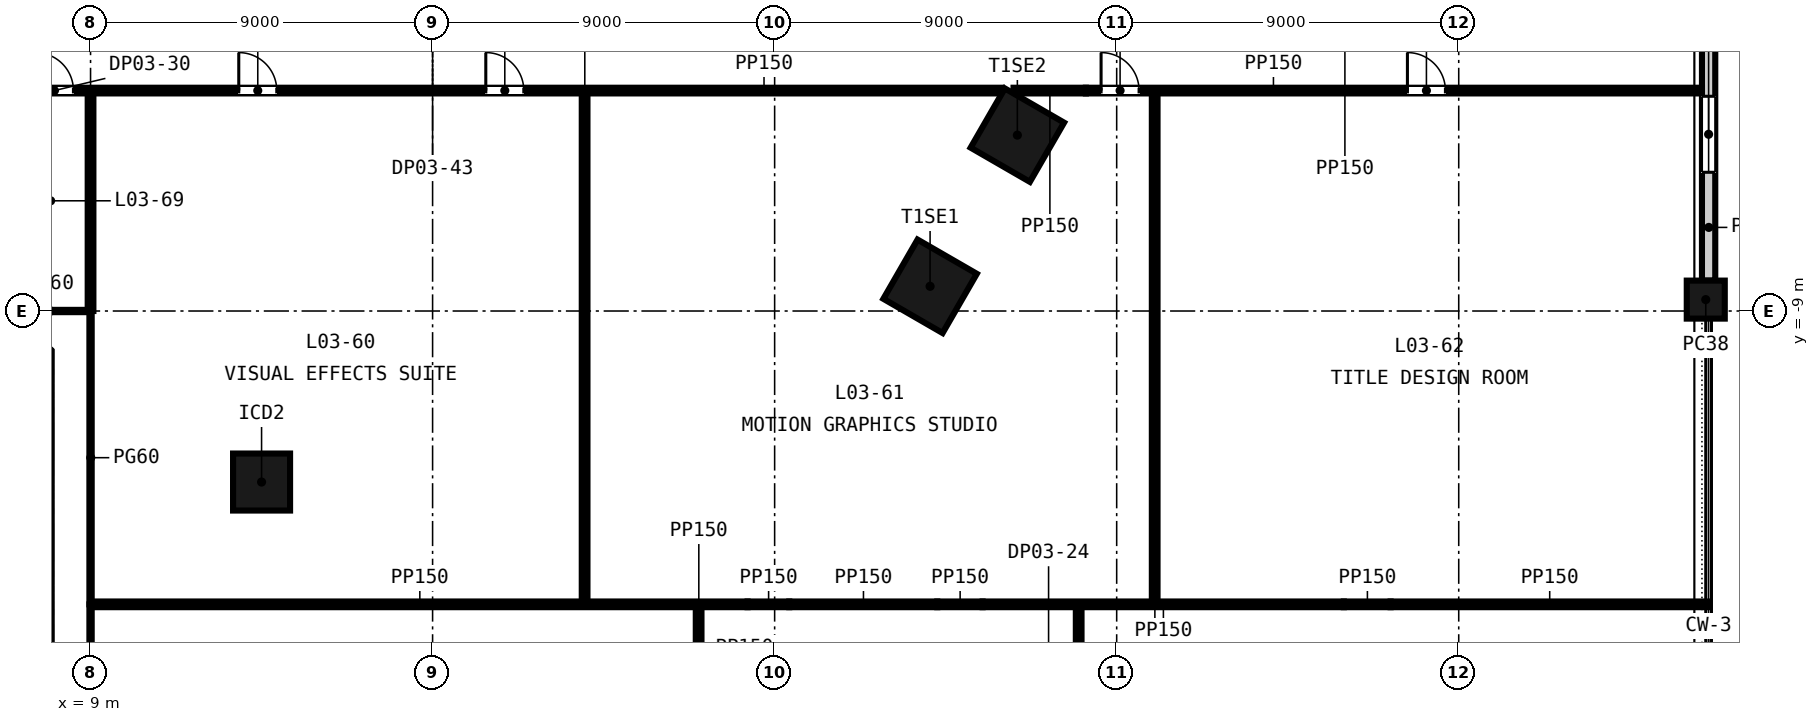
"""IFC4 building model, lengths in metres.
Left out: names, types, materials, properties, quantities, classifications, styles, units other than length and angle.
Written with IfcOpenShell. Run it as: python <this file> out.ifc"""

import sys

from ifc_helpers import new_model, si_unit, direction, frame, frame_2d, origin, origin_2d, place, context, subcontext, project, spatial, rectangle, extrude, element, fill, save


model = new_model("IFC4")
c1 = context("Model", 3, precision=1e-05, world=origin(), true_north=direction((0.0, 1.0)))
c2 = subcontext(c1, "Body", "Model", "MODEL_VIEW")
j1 = project(units=[si_unit("LENGTHUNIT", "METRE"), si_unit("PLANEANGLEUNIT", "RADIAN")], contexts=[c1])
p1 = place(None, origin())
s1 = spatial("IfcSite", under=j1, at=p1, CompositionType="ELEMENT")
p2 = place(p1, origin())
s2 = spatial("IfcBuilding", under=s1, at=p2, CompositionType="ELEMENT")
p3 = place(p2, frame((0.0, 0.0, 22.5)))
s3 = spatial("IfcBuildingStorey", under=s2, at=p3, CompositionType="ELEMENT", Elevation=22.5)
for number, where, z_axis, x_axis in (
    (1, (31.09, -8.35, -0.3), (0.0, 0.0, 1.0), (0.5, 0.866, 0.0)),
    (2, (33.387, -4.373, -0.3), (0.0, 0.0, 1.0), (0.5, 0.866, 0.0)),
):
    element("IfcColumn", number, at=place(p3, frame(where, z_axis=z_axis, x_axis=x_axis)), inside=s3, PredefinedType="COLUMN", context=c2, shape_type="SweptSolid", body=[
        extrude(rectangle(XDim=1.8, YDim=1.8, at=origin_2d()), origin(), (0.0, 0.0, 1.0), 4.5),
    ])
p4 = place(p3, frame((13.5, -13.5, -0.3), z_axis=(0.0, 0.0, 1.0), x_axis=(1.0, 0.0, 0.0)))
e3 = element("IfcColumn", 3, at=p4, inside=s3, PredefinedType="COLUMN", context=c2, shape_type="SweptSolid", body=[
    extrude(rectangle(XDim=1.5, YDim=1.5, at=origin_2d()), origin(), (0.0, 0.0, 1.0), 4.5),
])
p5 = place(p3, frame((51.5, -8.7, -0.3), z_axis=(0.0, 0.0, 1.0), x_axis=(0.0, 1.0, 0.0)))
e4 = element("IfcColumn", 4, at=p5, inside=s3, PredefinedType="COLUMN", context=c2, shape_type="SweptSolid", body=[
    extrude(rectangle(XDim=1.0, YDim=1.0, at=origin_2d()), origin(), (0.0, 0.0, 1.0), 4.5),
])
p6 = place(p3, frame((51.575, -8.2, -0.3), z_axis=(0.0, 0.0, 1.0), x_axis=(0.0, 1.0, 0.0)))
e5 = element("IfcWall", 5, at=p6, inside=s3, PredefinedType="SOLIDWALL", context=c2, shape_type="SweptSolid", body=[
    extrude(rectangle(XDim=7.7, YDim=0.35, at=frame_2d((3.85, 0.0))), origin(), (0.0, 0.0, 1.0), 3.6),
])
p7 = place(p6, frame((2.85, 0.0, 1.2)))
e6 = element("IfcOpeningElement", 6, at=p7, cuts=e5, PredefinedType="OPENING", context=c2, shape_type="SweptSolid", body=[
    extrude(rectangle(XDim=2.0, YDim=2.35, at=frame_2d((1.0, 1.175))), frame((0.0, 0.185, 0.0), z_axis=(0.0, -1.0, 0.0), x_axis=(1.0, 0.0, 0.0)), (0.0, 0.0, 1.0), 0.37),
])
p8 = place(p3, frame((9.03, -16.718, 0.0), z_axis=(0.0, 0.0, 1.0), x_axis=(1.0, 0.0, 0.0)))
e7 = element("IfcWall", 7, at=p8, inside=s3, PredefinedType="PARTITIONING", context=c2, shape_type="SweptSolid", body=[
    extrude(rectangle(XDim=17.258, YDim=0.15, at=frame_2d((8.629, 0.0))), origin(), (0.0, 0.0, 1.0), 4.2),
])
p9 = place(p3, frame((26.288, -16.718, 0.0), z_axis=(0.0, 0.0, 1.0), x_axis=(1.0, 0.0, 0.0)))
e8 = element("IfcWall", 8, at=p9, inside=s3, PredefinedType="PARTITIONING", context=c2, shape_type="SweptSolid", body=[
    extrude(rectangle(XDim=1.097, YDim=0.15, at=frame_2d((0.549, 0.0))), origin(), (0.0, 0.0, 1.0), 3.2),
])
p10 = place(p3, frame((27.385, -16.718, 0.0), z_axis=(0.0, 0.0, 1.0), x_axis=(1.0, 0.0, 0.0)))
e9 = element("IfcWall", 9, at=p10, inside=s3, PredefinedType="PARTITIONING", context=c2, shape_type="SweptSolid", body=[
    extrude(rectangle(XDim=3.894, YDim=0.15, at=frame_2d((1.947, 0.0))), origin(), (0.0, 0.0, 1.0), 4.2),
])
p11 = place(p3, frame((31.279, -16.718, 0.0), z_axis=(0.0, 0.0, 1.0), x_axis=(1.0, 0.0, 0.0)))
e10 = element("IfcWall", 10, at=p11, inside=s3, PredefinedType="PARTITIONING", context=c2, shape_type="SweptSolid", body=[
    extrude(rectangle(XDim=1.193, YDim=0.15, at=frame_2d((0.596, 0.0))), origin(), (0.0, 0.0, 1.0), 3.111),
])
p12 = place(p3, frame((32.472, -16.718, 0.0), z_axis=(0.0, 0.0, 1.0), x_axis=(1.0, 0.0, 0.0)))
e11 = element("IfcWall", 11, at=p12, inside=s3, PredefinedType="PARTITIONING", context=c2, shape_type="SweptSolid", body=[
    extrude(rectangle(XDim=9.504, YDim=0.15, at=frame_2d((4.752, 0.0))), origin(), (0.0, 0.0, 1.0), 4.2),
])
p13 = place(p3, frame((41.976, -16.718, 0.0), z_axis=(0.0, 0.0, 1.0), x_axis=(1.0, 0.0, 0.0)))
e12 = element("IfcWall", 12, at=p13, inside=s3, PredefinedType="PARTITIONING", context=c2, shape_type="SweptSolid", body=[
    extrude(rectangle(XDim=1.231, YDim=0.15, at=frame_2d((0.616, 0.0))), origin(), (0.0, 0.0, 1.0), 3.219),
])
p14 = place(p3, frame((43.208, -16.718, 0.0), z_axis=(0.0, 0.0, 1.0), x_axis=(1.0, 0.0, 0.0)))
e13 = element("IfcWall", 13, at=p14, inside=s3, PredefinedType="PARTITIONING", context=c2, shape_type="SweptSolid", body=[
    extrude(rectangle(XDim=8.363, YDim=0.15, at=frame_2d((4.181, 0.0))), origin(), (0.0, 0.0, 1.0), 4.2),
])
p15 = place(p3, frame((6.975, -9.0, 0.0), z_axis=(0.0, 0.0, 1.0), x_axis=(1.0, 0.0, 0.0)))
e14 = element("IfcWall", 14, at=p15, inside=s3, PredefinedType="PARTITIONING", context=c2, shape_type="SweptSolid", body=[
    extrude(rectangle(XDim=1.95, YDim=0.06, at=frame_2d((0.975, 0.0))), origin(), (0.0, 0.0, 1.0), 4.2),
])
p16 = place(p3, frame((-8.85, -3.2, 0.0), z_axis=(0.0, 0.0, 1.0), x_axis=(1.0, 0.0, 0.0)))
e15 = element("IfcWall", 15, at=p16, inside=s3, PredefinedType="PARTITIONING", context=c2, shape_type="SweptSolid", body=[
    extrude(rectangle(XDim=41.831, YDim=0.15, at=frame_2d((20.916, 0.0))), origin(), (0.0, 0.0, 1.0), 4.2),
])
p17 = place(p16, frame((21.75, 0.0, 0.0)))
e16 = element("IfcOpeningElement", 16, at=p17, cuts=e15, PredefinedType="OPENING", context=c2, shape_type="SweptSolid", body=[
    extrude(rectangle(XDim=1.0, YDim=2.1, at=frame_2d((0.5, 1.05))), frame((0.0, 0.085, 0.0), z_axis=(0.0, -1.0, 0.0), x_axis=(1.0, 0.0, 0.0)), (0.0, 0.0, 1.0), 0.17),
])
p18 = place(p16, frame((28.25, 0.0, 0.0)))
e17 = element("IfcOpeningElement", 17, at=p18, cuts=e15, PredefinedType="OPENING", context=c2, shape_type="SweptSolid", body=[
    extrude(rectangle(XDim=1.0, YDim=2.1, at=frame_2d((0.5, 1.05))), frame((0.0, 0.085, 0.0), z_axis=(0.0, -1.0, 0.0), x_axis=(1.0, 0.0, 0.0)), (0.0, 0.0, 1.0), 0.17),
])
p19 = place(p16, frame((2.65, 0.0, 0.0)))
e18 = element("IfcOpeningElement", 18, at=p19, cuts=e15, PredefinedType="OPENING", context=c2, shape_type="SweptSolid", body=[
    extrude(rectangle(XDim=1.0, YDim=2.1, at=frame_2d((0.5, 1.05))), frame((0.0, 0.085, 0.0), z_axis=(0.0, -1.0, 0.0), x_axis=(1.0, 0.0, 0.0)), (0.0, 0.0, 1.0), 0.17),
])
p20 = place(p16, frame((8.95, 0.0, 0.0)))
e19 = element("IfcOpeningElement", 19, at=p20, cuts=e15, PredefinedType="OPENING", context=c2, shape_type="SweptSolid", body=[
    extrude(rectangle(XDim=1.0, YDim=2.1, at=frame_2d((0.5, 1.05))), frame((0.0, 0.085, 0.0), z_axis=(0.0, -1.0, 0.0), x_axis=(1.0, 0.0, 0.0)), (0.0, 0.0, 1.0), 0.17),
])
p21 = place(p16, frame((13.65, 0.0, 0.0)))
e20 = element("IfcOpeningElement", 20, at=p21, cuts=e15, PredefinedType="OPENING", context=c2, shape_type="SweptSolid", body=[
    extrude(rectangle(XDim=1.0, YDim=2.1, at=frame_2d((0.5, 1.05))), frame((0.0, 0.085, 0.0), z_axis=(0.0, -1.0, 0.0), x_axis=(1.0, 0.0, 0.0)), (0.0, 0.0, 1.0), 0.17),
])
p22 = place(p16, frame((16.4, 0.0, 0.0)))
e21 = element("IfcOpeningElement", 21, at=p22, cuts=e15, PredefinedType="OPENING", context=c2, shape_type="SweptSolid", body=[
    extrude(rectangle(XDim=1.0, YDim=2.1, at=frame_2d((0.5, 1.05))), frame((0.0, 0.085, 0.0), z_axis=(0.0, -1.0, 0.0), x_axis=(1.0, 0.0, 0.0)), (0.0, 0.0, 1.0), 0.17),
])
p23 = place(p3, frame((33.286, -3.2, 0.0), z_axis=(0.0, 0.0, 1.0), x_axis=(1.0, 0.0, 0.0)))
e22 = element("IfcWall", 22, at=p23, inside=s3, PredefinedType="PARTITIONING", context=c2, shape_type="SweptSolid", body=[
    extrude(rectangle(XDim=1.904, YDim=0.15, at=frame_2d((0.952, 0.0))), origin(), (0.0, 0.0, 1.0), 3.2),
])
p24 = place(p3, frame((35.189, -3.2, 0.0), z_axis=(0.0, 0.0, 1.0), x_axis=(1.0, 0.0, 0.0)))
e23 = element("IfcWall", 23, at=p24, inside=s3, PredefinedType="PARTITIONING", context=c2, shape_type="SweptSolid", body=[
    extrude(rectangle(XDim=16.21, YDim=0.15, at=frame_2d((8.105, 0.0))), origin(), (0.0, 0.0, 1.0), 4.2),
])
p25 = place(p24, frame((0.4, 0.0, 0.0)))
e24 = element("IfcOpeningElement", 24, at=p25, cuts=e23, PredefinedType="OPENING", context=c2, shape_type="SweptSolid", body=[
    extrude(rectangle(XDim=1.0, YDim=2.1, at=frame_2d((0.5, 1.05))), frame((0.0, 0.085, 0.0), z_axis=(0.0, -1.0, 0.0), x_axis=(1.0, 0.0, 0.0)), (0.0, 0.0, 1.0), 0.17),
])
p26 = place(p24, frame((8.46, 0.0, 0.0)))
e25 = element("IfcOpeningElement", 25, at=p26, cuts=e23, PredefinedType="OPENING", context=c2, shape_type="SweptSolid", body=[
    extrude(rectangle(XDim=1.0, YDim=2.1, at=frame_2d((0.5, 1.05))), frame((0.0, 0.085, 0.0), z_axis=(0.0, -1.0, 0.0), x_axis=(1.0, 0.0, 0.0)), (0.0, 0.0, 1.0), 0.17),
])
p27 = place(p3, frame((9.0, -23.953, 0.0), z_axis=(0.0, 0.0, 1.0), x_axis=(0.0, 1.0, 0.0)))
e26 = element("IfcWall", 26, at=p27, inside=s3, PredefinedType="PARTITIONING", context=c2, shape_type="SweptSolid", body=[
    extrude(rectangle(XDim=7.233, YDim=0.06, at=frame_2d((3.617, 0.0))), origin(), (0.0, 0.0, 1.0), 4.2),
])
p28 = place(p3, frame((9.0, -16.717, 0.0), z_axis=(0.0, 0.0, 1.0), x_axis=(0.0, 1.0, 0.0)))
e27 = element("IfcWall", 27, at=p28, inside=s3, PredefinedType="PARTITIONING", context=c2, shape_type="SweptSolid", body=[
    extrude(rectangle(XDim=7.716, YDim=0.06, at=frame_2d((3.858, 0.0))), origin(), (0.0, 0.0, 1.0), 4.2),
])
p29 = place(p3, frame((9.0, -9.0, 0.0), z_axis=(0.0, 0.0, 1.0), x_axis=(0.0, 1.0, 0.0)))
e28 = element("IfcWall", 28, at=p29, inside=s3, PredefinedType="PARTITIONING", context=c2, shape_type="SweptSolid", body=[
    extrude(rectangle(XDim=5.725, YDim=0.15, at=frame_2d((2.863, 0.0))), origin(), (0.0, 0.0, 1.0), 4.2),
])
p30 = place(p3, frame((22.0, -16.643, 0.0), z_axis=(0.0, 0.0, 1.0), x_axis=(0.0, 1.0, 0.0)))
e29 = element("IfcWall", 29, at=p30, inside=s3, PredefinedType="PARTITIONING", context=c2, shape_type="SweptSolid", body=[
    extrude(rectangle(XDim=13.368, YDim=0.15, at=frame_2d((6.684, 0.0))), origin(), (0.0, 0.0, 1.0), 4.2),
])
p31 = place(p3, frame((25.0, -18.949, 0.0), z_axis=(0.0, 0.0, 1.0), x_axis=(0.0, 1.0, 0.0)))
e30 = element("IfcWall", 30, at=p31, inside=s3, PredefinedType="PARTITIONING", context=c2, shape_type="SweptSolid", body=[
    extrude(rectangle(XDim=2.156, YDim=0.15, at=frame_2d((1.078, 0.0))), origin(), (0.0, 0.0, 1.0), 4.2),
])
p32 = place(p3, frame((35.0, -17.841, 0.0), z_axis=(0.0, 0.0, 1.0), x_axis=(0.0, 1.0, 0.0)))
e31 = element("IfcWall", 31, at=p32, inside=s3, PredefinedType="PARTITIONING", context=c2, shape_type="SweptSolid", body=[
    extrude(rectangle(XDim=1.048, YDim=0.15, at=frame_2d((0.524, 0.0))), origin(), (0.0, 0.0, 1.0), 4.2),
])
p33 = place(p3, frame((37.0, -16.643, 0.0), z_axis=(0.0, 0.0, 1.0), x_axis=(0.0, 1.0, 0.0)))
e32 = element("IfcWall", 32, at=p33, inside=s3, PredefinedType="PARTITIONING", context=c2, shape_type="SweptSolid", body=[
    extrude(rectangle(XDim=13.368, YDim=0.15, at=frame_2d((6.684, 0.0))), origin(), (0.0, 0.0, 1.0), 4.2),
])
p34 = place(p7, origin())
e33 = element("IfcWindow", 33, at=p34, inside=s3, PartitioningType="SINGLE_PANEL", PredefinedType="WINDOW", context=c2, shape_type="SweptSolid", body=[
    extrude(rectangle(XDim=2.0, YDim=2.35, at=frame_2d((1.0, 1.175))), frame((0.0, 0.03, 0.0), z_axis=(0.0, -1.0, 0.0), x_axis=(1.0, 0.0, 0.0)), (0.0, 0.0, 1.0), 0.06),
])
fill(e6, e33)
p35 = place(p17, origin())
e34 = element("IfcDoor", 34, at=p35, inside=s3, OperationType="SINGLE_SWING_LEFT", PredefinedType="DOOR", context=c2, shape_type="SweptSolid", body=[
    extrude(rectangle(XDim=1.0, YDim=2.1, at=frame_2d((0.5, 1.05))), frame((0.0, 0.025, 0.0), z_axis=(0.0, -1.0, 0.0), x_axis=(1.0, 0.0, 0.0)), (0.0, 0.0, 1.0), 0.05),
])
fill(e16, e34)
p36 = place(p18, origin())
e35 = element("IfcDoor", 35, at=p36, inside=s3, OperationType="SINGLE_SWING_LEFT", PredefinedType="DOOR", context=c2, shape_type="SweptSolid", body=[
    extrude(rectangle(XDim=1.0, YDim=2.1, at=frame_2d((0.5, 1.05))), frame((0.0, 0.025, 0.0), z_axis=(0.0, -1.0, 0.0), x_axis=(1.0, 0.0, 0.0)), (0.0, 0.0, 1.0), 0.05),
])
fill(e17, e35)
p37 = place(p25, origin())
e36 = element("IfcDoor", 36, at=p37, inside=s3, OperationType="SINGLE_SWING_LEFT", PredefinedType="DOOR", context=c2, shape_type="SweptSolid", body=[
    extrude(rectangle(XDim=1.0, YDim=2.1, at=frame_2d((0.5, 1.05))), frame((0.0, 0.025, 0.0), z_axis=(0.0, -1.0, 0.0), x_axis=(1.0, 0.0, 0.0)), (0.0, 0.0, 1.0), 0.05),
])
fill(e24, e36)
p38 = place(p26, origin())
e37 = element("IfcDoor", 37, at=p38, inside=s3, OperationType="SINGLE_SWING_LEFT", PredefinedType="DOOR", context=c2, shape_type="SweptSolid", body=[
    extrude(rectangle(XDim=1.0, YDim=2.1, at=frame_2d((0.5, 1.05))), frame((0.0, 0.025, 0.0), z_axis=(0.0, -1.0, 0.0), x_axis=(1.0, 0.0, 0.0)), (0.0, 0.0, 1.0), 0.05),
])
fill(e25, e37)
p39 = place(p22, origin())
e38 = element("IfcDoor", 38, at=p39, inside=s3, OperationType="SINGLE_SWING_LEFT", PredefinedType="DOOR", context=c2, shape_type="SweptSolid", body=[
    extrude(rectangle(XDim=1.0, YDim=2.1, at=frame_2d((0.5, 1.05))), frame((0.0, 0.025, 0.0), z_axis=(0.0, -1.0, 0.0), x_axis=(1.0, 0.0, 0.0)), (0.0, 0.0, 1.0), 0.05),
])
fill(e21, e38)
save(model, sys.argv[1])
